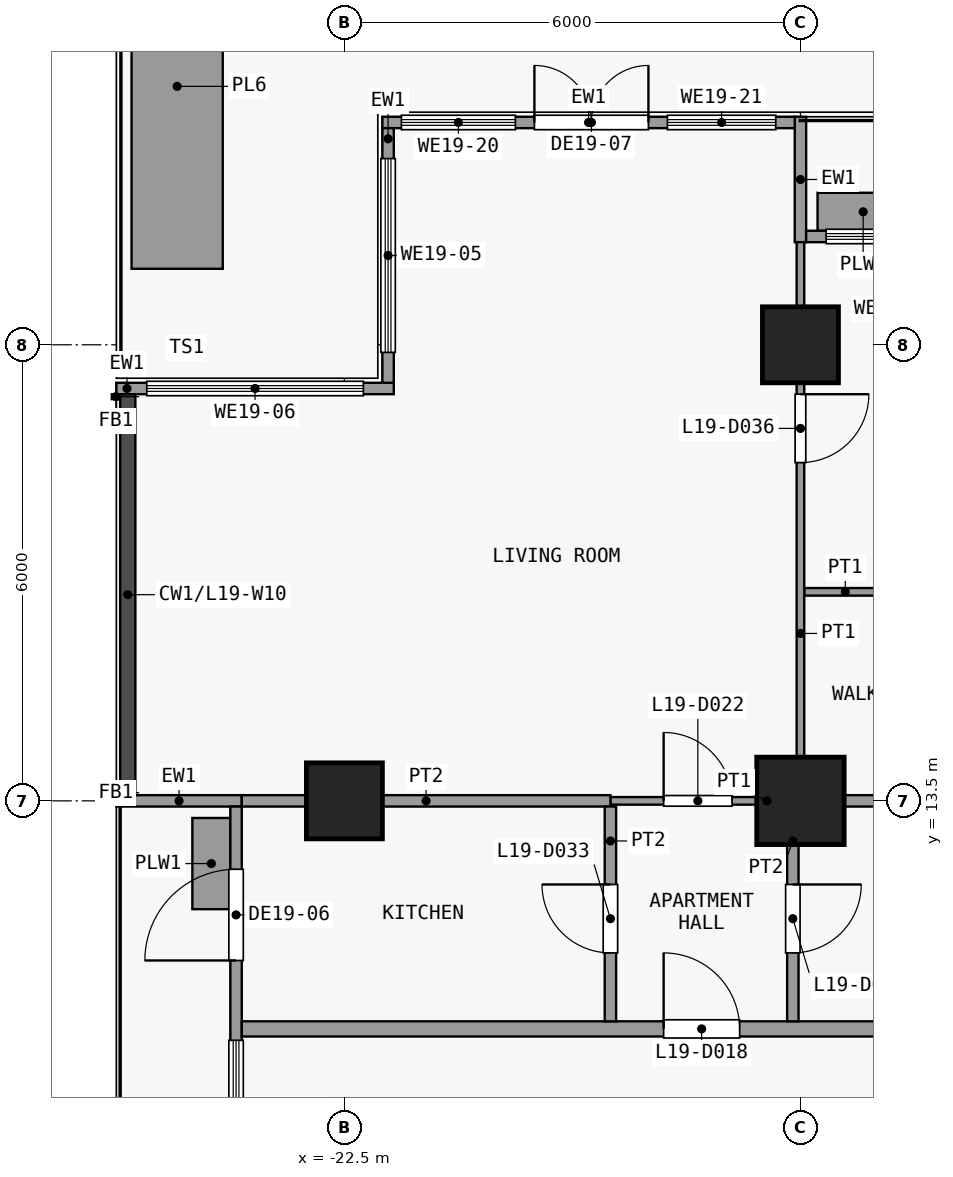
"""IFC4 building model, lengths in metres.
Left out: names, types, materials, properties, quantities, classifications, styles, units other than length and angle.
Written with IfcOpenShell. Run it as: python <this file> out.ifc"""

import sys

from ifc_helpers import new_model, si_unit, direction, frame, frame_2d, origin, origin_2d, place, context, subcontext, project, spatial, rectangle, extrude, element, fill, save


model = new_model("IFC4")
c1 = context("Model", 3, precision=1e-05, world=origin(), true_north=direction((0.0, 1.0)))
c2 = subcontext(c1, "Body", "Model", "MODEL_VIEW")
j1 = project(units=[si_unit("LENGTHUNIT", "METRE"), si_unit("PLANEANGLEUNIT", "RADIAN")], contexts=[c1])
p1 = place(None, origin())
s1 = spatial("IfcSite", under=j1, at=p1, CompositionType="ELEMENT")
p2 = place(p1, origin())
s2 = spatial("IfcBuilding", under=s1, at=p2, CompositionType="ELEMENT")
p3 = place(p2, frame((0.0, 0.0, 81.1)))
s3 = spatial("IfcBuildingStorey", under=s2, at=p3, CompositionType="ELEMENT", Elevation=81.1)
p4 = place(p3, frame((-22.5, 13.5, 0.0), z_axis=(0.0, 0.0, 1.0), x_axis=(1.0, 0.0, 0.0)))
e1 = element("IfcColumn", 1, at=p4, inside=s3, PredefinedType="COLUMN", context=c2, shape_type="SweptSolid", body=[
    extrude(rectangle(XDim=1.0, YDim=1.0, at=origin_2d()), origin(), (0.0, 0.0, 1.0), 3.6),
])
p5 = place(p3, frame((-16.5, 13.5, 0.0), z_axis=(0.0, 0.0, 1.0), x_axis=(1.0, 0.0, 0.0)))
e2 = element("IfcColumn", 2, at=p5, inside=s3, PredefinedType="COLUMN", context=c2, shape_type="SweptSolid", body=[
    extrude(rectangle(XDim=1.15, YDim=1.15, at=origin_2d()), origin(), (0.0, 0.0, 1.0), 3.6),
])
p6 = place(p3, frame((-16.5, 19.5, 0.0), z_axis=(0.0, 0.0, 1.0), x_axis=(1.0, 0.0, 0.0)))
e3 = element("IfcColumn", 3, at=p6, inside=s3, PredefinedType="COLUMN", context=c2, shape_type="SweptSolid", body=[
    extrude(rectangle(XDim=1.0, YDim=1.0, at=origin_2d()), origin(), (0.0, 0.0, 1.0), 3.6),
])
p7 = place(p3, frame((-21.925, 19.0, 0.0), z_axis=(0.0, 0.0, 1.0), x_axis=(0.0, 1.0, 0.0)))
e4 = element("IfcWall", 4, at=p7, inside=s3, PredefinedType="SOLIDWALL", context=c2, shape_type="SweptSolid", body=[
    extrude(rectangle(XDim=3.35, YDim=0.15, at=frame_2d((1.675, 0.0))), origin(), (0.0, 0.0, 1.0), 3.3),
])
p8 = place(p7, frame((0.4, 0.0, 0.9)))
e5 = element("IfcOpeningElement", 5, at=p8, cuts=e4, PredefinedType="OPENING", context=c2, shape_type="SweptSolid", body=[
    extrude(rectangle(XDim=2.55, YDim=2.4, at=frame_2d((1.275, 1.2))), frame((0.0, 0.085, 0.0), z_axis=(0.0, -1.0, 0.0), x_axis=(1.0, 0.0, 0.0)), (0.0, 0.0, 1.0), 0.17),
])
p9 = place(p3, frame((-25.5, 18.925, 0.0), z_axis=(0.0, 0.0, 1.0), x_axis=(1.0, 0.0, 0.0)))
e6 = element("IfcWall", 6, at=p9, inside=s3, PredefinedType="SOLIDWALL", context=c2, shape_type="SweptSolid", body=[
    extrude(rectangle(XDim=3.65, YDim=0.15, at=frame_2d((1.825, 0.0))), origin(), (0.0, 0.0, 1.0), 3.3),
])
p10 = place(p9, frame((0.4, 0.0, 0.9)))
e7 = element("IfcOpeningElement", 7, at=p10, cuts=e6, PredefinedType="OPENING", context=c2, shape_type="SweptSolid", body=[
    extrude(rectangle(XDim=2.85, YDim=2.4, at=frame_2d((1.425, 1.2))), frame((0.0, 0.085, 0.0), z_axis=(0.0, -1.0, 0.0), x_axis=(1.0, 0.0, 0.0)), (0.0, 0.0, 1.0), 0.17),
])
p11 = place(p3, frame((-16.5, 20.85, 0.0), z_axis=(0.0, 0.0, 1.0), x_axis=(0.0, 1.0, 0.0)))
e8 = element("IfcWall", 8, at=p11, inside=s3, PredefinedType="SOLIDWALL", context=c2, shape_type="SweptSolid", body=[
    extrude(rectangle(XDim=1.65, YDim=0.15, at=frame_2d((0.825, 0.0))), origin(), (0.0, 0.0, 1.0), 3.3),
])
p12 = place(p3, frame((-16.425, 20.925, 0.0), z_axis=(0.0, 0.0, 1.0), x_axis=(1.0, 0.0, 0.0)))
e9 = element("IfcWall", 9, at=p12, inside=s3, PredefinedType="SOLIDWALL", context=c2, shape_type="SweptSolid", body=[
    extrude(rectangle(XDim=5.85, YDim=0.15, at=frame_2d((2.925, 0.0))), origin(), (0.0, 0.0, 1.0), 3.3),
])
p13 = place(p12, frame((2.325, 0.0, 0.0)))
e10 = element("IfcOpeningElement", 10, at=p13, cuts=e9, PredefinedType="OPENING", context=c2, shape_type="SweptSolid", body=[
    extrude(rectangle(XDim=1.2, YDim=2.4, at=frame_2d((0.6, 1.2))), frame((0.0, 0.085, 0.0), z_axis=(0.0, -1.0, 0.0), x_axis=(1.0, 0.0, 0.0)), (0.0, 0.0, 1.0), 0.17),
])
p14 = place(p12, frame((0.262, 0.0, 0.9)))
e11 = element("IfcOpeningElement", 11, at=p14, cuts=e9, PredefinedType="OPENING", context=c2, shape_type="SweptSolid", body=[
    extrude(rectangle(XDim=1.8, YDim=2.1, at=frame_2d((0.9, 1.05))), frame((0.0, 0.085, 0.0), z_axis=(0.0, -1.0, 0.0), x_axis=(1.0, 0.0, 0.0)), (0.0, 0.0, 1.0), 0.17),
])
p15 = place(p12, frame((3.788, 0.0, 0.9)))
e12 = element("IfcOpeningElement", 12, at=p15, cuts=e9, PredefinedType="OPENING", context=c2, shape_type="SweptSolid", body=[
    extrude(rectangle(XDim=1.8, YDim=2.1, at=frame_2d((0.9, 1.05))), frame((0.0, 0.085, 0.0), z_axis=(0.0, -1.0, 0.0), x_axis=(1.0, 0.0, 0.0)), (0.0, 0.0, 1.0), 0.17),
])
p16 = place(p3, frame((-16.275, 21.25, 0.0), z_axis=(0.0, 0.0, 1.0), x_axis=(1.0, 0.0, 0.0)))
e13 = element("IfcWall", 13, at=p16, inside=s3, PredefinedType="USERDEFINED", context=c2, shape_type="SweptSolid", body=[
    extrude(rectangle(XDim=1.2, YDim=0.5, at=frame_2d((0.6, 0.0))), origin(), (0.0, 0.0, 1.0), 0.9),
])
p17 = place(p3, frame((-23.85, 13.5, 0.0), z_axis=(0.0, 0.0, 1.0), x_axis=(-1.0, 0.0, 0.0)))
e14 = element("IfcWall", 14, at=p17, inside=s3, PredefinedType="SOLIDWALL", context=c2, shape_type="SweptSolid", body=[
    extrude(rectangle(XDim=1.65, YDim=0.15, at=frame_2d((0.825, 0.0))), origin(), (0.0, 0.0, 1.0), 3.3),
])
p18 = place(p3, frame((-23.925, 7.5, 0.0), z_axis=(0.0, 0.0, 1.0), x_axis=(0.0, 1.0, 0.0)))
e15 = element("IfcWall", 15, at=p18, inside=s3, PredefinedType="SOLIDWALL", context=c2, shape_type="SweptSolid", body=[
    extrude(rectangle(XDim=5.925, YDim=0.15, at=frame_2d((2.962, 0.0))), origin(), (0.0, 0.0, 1.0), 3.3),
])
p19 = place(p18, frame((3.9, 0.0, 0.0)))
e16 = element("IfcOpeningElement", 16, at=p19, cuts=e15, PredefinedType="OPENING", context=c2, shape_type="SweptSolid", body=[
    extrude(rectangle(XDim=1.2, YDim=2.4, at=frame_2d((0.6, 1.2))), frame((0.0, 0.085, 0.0), z_axis=(0.0, -1.0, 0.0), x_axis=(1.0, 0.0, 0.0)), (0.0, 0.0, 1.0), 0.17),
])
p20 = place(p18, frame((1.05, 0.0, 0.9)))
e17 = element("IfcOpeningElement", 17, at=p20, cuts=e15, PredefinedType="OPENING", context=c2, shape_type="SweptSolid", body=[
    extrude(rectangle(XDim=1.8, YDim=2.1, at=frame_2d((0.9, 1.05))), frame((0.0, 0.085, 0.0), z_axis=(0.0, -1.0, 0.0), x_axis=(1.0, 0.0, 0.0)), (0.0, 0.0, 1.0), 0.17),
])
p21 = place(p3, frame((-24.25, 12.075, 0.0), z_axis=(0.0, 0.0, 1.0), x_axis=(0.0, 1.0, 0.0)))
e18 = element("IfcWall", 18, at=p21, inside=s3, PredefinedType="USERDEFINED", context=c2, shape_type="SweptSolid", body=[
    extrude(rectangle(XDim=1.2, YDim=0.5, at=frame_2d((0.6, 0.0))), origin(), (0.0, 0.0, 1.0), 0.9),
])
p22 = place(p3, frame((-22.0, 22.425, 0.0), z_axis=(0.0, 0.0, 1.0), x_axis=(1.0, 0.0, 0.0)))
e19 = element("IfcWall", 19, at=p22, inside=s3, PredefinedType="SOLIDWALL", context=c2, shape_type="SweptSolid", body=[
    extrude(rectangle(XDim=5.425, YDim=0.15, at=frame_2d((2.712, 0.0))), origin(), (0.0, 0.0, 1.0), 3.3),
])
p23 = place(p22, frame((2.0, 0.0, 0.0)))
e20 = element("IfcOpeningElement", 20, at=p23, cuts=e19, PredefinedType="OPENING", context=c2, shape_type="SweptSolid", body=[
    extrude(rectangle(XDim=1.5, YDim=2.4, at=frame_2d((0.75, 1.2))), frame((0.0, 0.085, 0.0), z_axis=(0.0, -1.0, 0.0), x_axis=(1.0, 0.0, 0.0)), (0.0, 0.0, 1.0), 0.17),
])
p24 = place(p22, frame((0.25, 0.0, 0.9)))
e21 = element("IfcOpeningElement", 21, at=p24, cuts=e19, PredefinedType="OPENING", context=c2, shape_type="SweptSolid", body=[
    extrude(rectangle(XDim=1.5, YDim=2.1, at=frame_2d((0.75, 1.05))), frame((0.0, 0.085, 0.0), z_axis=(0.0, -1.0, 0.0), x_axis=(1.0, 0.0, 0.0)), (0.0, 0.0, 1.0), 0.17),
])
p25 = place(p22, frame((3.75, 0.0, 0.9)))
e22 = element("IfcOpeningElement", 22, at=p25, cuts=e19, PredefinedType="OPENING", context=c2, shape_type="SweptSolid", body=[
    extrude(rectangle(XDim=1.425, YDim=2.1, at=frame_2d((0.712, 1.05))), frame((0.0, 0.085, 0.0), z_axis=(0.0, -1.0, 0.0), x_axis=(1.0, 0.0, 0.0)), (0.0, 0.0, 1.0), 0.17),
])
p26 = place(p3, frame((-24.7, 20.5, 0.0), z_axis=(0.0, 0.0, 1.0), x_axis=(0.0, 1.0, 0.0)))
e23 = element("IfcWall", 23, at=p26, inside=s3, PredefinedType="USERDEFINED", context=c2, shape_type="SweptSolid", body=[
    extrude(rectangle(XDim=4.8, YDim=1.2, at=frame_2d((2.4, 0.0))), origin(), (0.0, 0.0, 1.0), 0.9),
])
p27 = place(p3, frame((-23.85, 10.5, 0.0), z_axis=(0.0, 0.0, 1.0), x_axis=(1.0, 0.0, 0.0)))
e24 = element("IfcWall", 24, at=p27, inside=s3, PredefinedType="PARTITIONING", context=c2, shape_type="SweptSolid", body=[
    extrude(rectangle(XDim=49.2, YDim=0.2, at=frame_2d((24.6, 0.0))), origin(), (0.0, 0.0, 1.0), 3.3),
])
p28 = place(p27, frame((5.55, 0.0, 0.0)))
e25 = element("IfcOpeningElement", 25, at=p28, cuts=e24, PredefinedType="OPENING", context=c2, shape_type="SweptSolid", body=[
    extrude(rectangle(XDim=1.0, YDim=2.1, at=frame_2d((0.5, 1.05))), frame((0.0, 0.11, 0.0), z_axis=(0.0, -1.0, 0.0), x_axis=(1.0, 0.0, 0.0)), (0.0, 0.0, 1.0), 0.22),
])
p29 = place(p27, frame((14.05, 0.0, 0.0)))
e26 = element("IfcOpeningElement", 26, at=p29, cuts=e24, PredefinedType="OPENING", context=c2, shape_type="SweptSolid", body=[
    extrude(rectangle(XDim=1.0, YDim=2.1, at=frame_2d((0.5, 1.05))), frame((0.0, 0.11, 0.0), z_axis=(0.0, -1.0, 0.0), x_axis=(1.0, 0.0, 0.0)), (0.0, 0.0, 1.0), 0.22),
])
p30 = place(p27, frame((22.55, 0.0, 0.0)))
e27 = element("IfcOpeningElement", 27, at=p30, cuts=e24, PredefinedType="OPENING", context=c2, shape_type="SweptSolid", body=[
    extrude(rectangle(XDim=1.0, YDim=2.1, at=frame_2d((0.5, 1.05))), frame((0.0, 0.11, 0.0), z_axis=(0.0, -1.0, 0.0), x_axis=(1.0, 0.0, 0.0)), (0.0, 0.0, 1.0), 0.22),
])
p31 = place(p27, frame((43.55, 0.0, 0.0)))
e28 = element("IfcOpeningElement", 28, at=p31, cuts=e24, PredefinedType="OPENING", context=c2, shape_type="SweptSolid", body=[
    extrude(rectangle(XDim=1.0, YDim=2.1, at=frame_2d((0.5, 1.05))), frame((0.0, 0.11, 0.0), z_axis=(0.0, -1.0, 0.0), x_axis=(1.0, 0.0, 0.0)), (0.0, 0.0, 1.0), 0.22),
])
p32 = place(p3, frame((-19.0, 13.5, 0.0), z_axis=(0.0, 0.0, 1.0), x_axis=(1.0, 0.0, 0.0)))
e29 = element("IfcWall", 29, at=p32, inside=s3, PredefinedType="PARTITIONING", context=c2, shape_type="SweptSolid", body=[
    extrude(rectangle(XDim=2.4, YDim=0.1, at=frame_2d((1.2, 0.0))), origin(), (0.0, 0.0, 1.0), 3.3),
])
p33 = place(p32, frame((0.7, 0.0, 0.0)))
e30 = element("IfcOpeningElement", 30, at=p33, cuts=e29, PredefinedType="OPENING", context=c2, shape_type="SweptSolid", body=[
    extrude(rectangle(XDim=0.9, YDim=2.1, at=frame_2d((0.45, 1.05))), frame((0.0, 0.06, 0.0), z_axis=(0.0, -1.0, 0.0), x_axis=(1.0, 0.0, 0.0)), (0.0, 0.0, 1.0), 0.12),
])
p34 = place(p3, frame((-23.85, 13.5, 0.0), z_axis=(0.0, 0.0, 1.0), x_axis=(1.0, 0.0, 0.0)))
e31 = element("IfcWall", 31, at=p34, inside=s3, PredefinedType="PARTITIONING", context=c2, shape_type="SweptSolid", body=[
    extrude(rectangle(XDim=4.85, YDim=0.15, at=frame_2d((2.425, 0.0))), origin(), (0.0, 0.0, 1.0), 3.3),
])
p35 = place(p3, frame((-16.5, 13.5, 0.0), z_axis=(0.0, 0.0, 1.0), x_axis=(1.0, 0.0, 0.0)))
e32 = element("IfcWall", 32, at=p35, inside=s3, PredefinedType="PARTITIONING", context=c2, shape_type="SweptSolid", body=[
    extrude(rectangle(XDim=6.0, YDim=0.15, at=frame_2d((3.0, 0.0))), origin(), (0.0, 0.0, 1.0), 3.3),
])
p36 = place(p3, frame((-16.45, 16.25, 0.0), z_axis=(0.0, 0.0, 1.0), x_axis=(1.0, 0.0, 0.0)))
e33 = element("IfcWall", 33, at=p36, inside=s3, PredefinedType="PARTITIONING", context=c2, shape_type="SweptSolid", body=[
    extrude(rectangle(XDim=3.25, YDim=0.1, at=frame_2d((1.625, 0.0))), origin(), (0.0, 0.0, 1.0), 3.3),
])
p37 = place(p36, frame((1.2, 0.0, 0.0)))
e34 = element("IfcOpeningElement", 34, at=p37, cuts=e33, PredefinedType="OPENING", context=c2, shape_type="SweptSolid", body=[
    extrude(rectangle(XDim=0.9, YDim=2.1, at=frame_2d((0.45, 1.05))), frame((0.0, 0.06, 0.0), z_axis=(0.0, -1.0, 0.0), x_axis=(1.0, 0.0, 0.0)), (0.0, 0.0, 1.0), 0.12),
])
p38 = place(p3, frame((-19.0, 10.6, 0.0), z_axis=(0.0, 0.0, 1.0), x_axis=(0.0, 1.0, 0.0)))
e35 = element("IfcWall", 35, at=p38, inside=s3, PredefinedType="PARTITIONING", context=c2, shape_type="SweptSolid", body=[
    extrude(rectangle(XDim=2.825, YDim=0.15, at=frame_2d((1.413, 0.0))), origin(), (0.0, 0.0, 1.0), 3.3),
])
p39 = place(p38, frame((0.9, 0.0, 0.0)))
e36 = element("IfcOpeningElement", 36, at=p39, cuts=e35, PredefinedType="OPENING", context=c2, shape_type="SweptSolid", body=[
    extrude(rectangle(XDim=0.9, YDim=2.1, at=frame_2d((0.45, 1.05))), frame((0.0, 0.085, 0.0), z_axis=(0.0, -1.0, 0.0), x_axis=(1.0, 0.0, 0.0)), (0.0, 0.0, 1.0), 0.17),
])
p40 = place(p3, frame((-16.6, 10.6, 0.0), z_axis=(0.0, 0.0, 1.0), x_axis=(0.0, 1.0, 0.0)))
e37 = element("IfcWall", 37, at=p40, inside=s3, PredefinedType="PARTITIONING", context=c2, shape_type="SweptSolid", body=[
    extrude(rectangle(XDim=2.825, YDim=0.15, at=frame_2d((1.413, 0.0))), origin(), (0.0, 0.0, 1.0), 3.3),
])
p41 = place(p40, frame((0.9, 0.0, 0.0)))
e38 = element("IfcOpeningElement", 38, at=p41, cuts=e37, PredefinedType="OPENING", context=c2, shape_type="SweptSolid", body=[
    extrude(rectangle(XDim=0.9, YDim=2.1, at=frame_2d((0.45, 1.05))), frame((0.0, 0.085, 0.0), z_axis=(0.0, -1.0, 0.0), x_axis=(1.0, 0.0, 0.0)), (0.0, 0.0, 1.0), 0.17),
])
p42 = place(p3, frame((-16.5, 13.575, 0.0), z_axis=(0.0, 0.0, 1.0), x_axis=(0.0, 1.0, 0.0)))
e39 = element("IfcWall", 39, at=p42, inside=s3, PredefinedType="PARTITIONING", context=c2, shape_type="SweptSolid", body=[
    extrude(rectangle(XDim=7.275, YDim=0.1, at=frame_2d((3.638, 0.0))), origin(), (0.0, 0.0, 1.0), 3.3),
])
p43 = place(p42, frame((4.375, 0.0, 0.0)))
e40 = element("IfcOpeningElement", 40, at=p43, cuts=e39, PredefinedType="OPENING", context=c2, shape_type="SweptSolid", body=[
    extrude(rectangle(XDim=0.9, YDim=2.1, at=frame_2d((0.45, 1.05))), frame((0.0, 0.06, 0.0), z_axis=(0.0, -1.0, 0.0), x_axis=(1.0, 0.0, 0.0)), (0.0, 0.0, 1.0), 0.12),
])
p44 = place(p8, origin())
e41 = element("IfcWindow", 41, at=p44, inside=s3, PartitioningType="SINGLE_PANEL", PredefinedType="WINDOW", context=c2, shape_type="SweptSolid", body=[
    extrude(rectangle(XDim=2.55, YDim=2.4, at=frame_2d((1.275, 1.2))), frame((0.0, 0.03, 0.0), z_axis=(0.0, -1.0, 0.0), x_axis=(1.0, 0.0, 0.0)), (0.0, 0.0, 1.0), 0.06),
])
fill(e5, e41)
p45 = place(p10, origin())
e42 = element("IfcWindow", 42, at=p45, inside=s3, PartitioningType="SINGLE_PANEL", PredefinedType="WINDOW", context=c2, shape_type="SweptSolid", body=[
    extrude(rectangle(XDim=2.85, YDim=2.4, at=frame_2d((1.425, 1.2))), frame((0.0, 0.03, 0.0), z_axis=(0.0, -1.0, 0.0), x_axis=(1.0, 0.0, 0.0)), (0.0, 0.0, 1.0), 0.06),
])
fill(e7, e42)
p46 = place(p14, origin())
e43 = element("IfcWindow", 43, at=p46, inside=s3, PartitioningType="SINGLE_PANEL", PredefinedType="WINDOW", context=c2, shape_type="SweptSolid", body=[
    extrude(rectangle(XDim=1.8, YDim=2.1, at=frame_2d((0.9, 1.05))), frame((0.0, 0.03, 0.0), z_axis=(0.0, -1.0, 0.0), x_axis=(1.0, 0.0, 0.0)), (0.0, 0.0, 1.0), 0.06),
])
fill(e11, e43)
p47 = place(p19, origin())
e44 = element("IfcDoor", 44, at=p47, inside=s3, OperationType="SINGLE_SWING_LEFT", PredefinedType="DOOR", context=c2, shape_type="SweptSolid", body=[
    extrude(rectangle(XDim=1.2, YDim=2.4, at=frame_2d((0.6, 1.2))), frame((0.0, 0.025, 0.0), z_axis=(0.0, -1.0, 0.0), x_axis=(1.0, 0.0, 0.0)), (0.0, 0.0, 1.0), 0.05),
])
fill(e16, e44)
p48 = place(p20, origin())
e45 = element("IfcWindow", 45, at=p48, inside=s3, PartitioningType="SINGLE_PANEL", PredefinedType="WINDOW", context=c2, shape_type="SweptSolid", body=[
    extrude(rectangle(XDim=1.8, YDim=2.1, at=frame_2d((0.9, 1.05))), frame((0.0, 0.03, 0.0), z_axis=(0.0, -1.0, 0.0), x_axis=(1.0, 0.0, 0.0)), (0.0, 0.0, 1.0), 0.06),
])
fill(e17, e45)
p49 = place(p23, origin())
e46 = element("IfcDoor", 46, at=p49, inside=s3, OperationType="DOUBLE_DOOR_SINGLE_SWING", PredefinedType="DOOR", context=c2, shape_type="SweptSolid", body=[
    extrude(rectangle(XDim=1.5, YDim=2.4, at=frame_2d((0.75, 1.2))), frame((0.0, 0.025, 0.0), z_axis=(0.0, -1.0, 0.0), x_axis=(1.0, 0.0, 0.0)), (0.0, 0.0, 1.0), 0.05),
])
fill(e20, e46)
p50 = place(p24, origin())
e47 = element("IfcWindow", 47, at=p50, inside=s3, PartitioningType="SINGLE_PANEL", PredefinedType="WINDOW", context=c2, shape_type="SweptSolid", body=[
    extrude(rectangle(XDim=1.5, YDim=2.1, at=frame_2d((0.75, 1.05))), frame((0.0, 0.03, 0.0), z_axis=(0.0, -1.0, 0.0), x_axis=(1.0, 0.0, 0.0)), (0.0, 0.0, 1.0), 0.06),
])
fill(e21, e47)
p51 = place(p25, origin())
e48 = element("IfcWindow", 48, at=p51, inside=s3, PartitioningType="SINGLE_PANEL", PredefinedType="WINDOW", context=c2, shape_type="SweptSolid", body=[
    extrude(rectangle(XDim=1.425, YDim=2.1, at=frame_2d((0.712, 1.05))), frame((0.0, 0.03, 0.0), z_axis=(0.0, -1.0, 0.0), x_axis=(1.0, 0.0, 0.0)), (0.0, 0.0, 1.0), 0.06),
])
fill(e22, e48)
p52 = place(p28, origin())
e49 = element("IfcDoor", 49, at=p52, inside=s3, OperationType="SINGLE_SWING_RIGHT", PredefinedType="DOOR", context=c2, shape_type="SweptSolid", body=[
    extrude(rectangle(XDim=1.0, YDim=2.1, at=frame_2d((0.5, 1.05))), frame((0.0, 0.025, 0.0), z_axis=(0.0, -1.0, 0.0), x_axis=(1.0, 0.0, 0.0)), (0.0, 0.0, 1.0), 0.05),
])
fill(e25, e49)
p53 = place(p33, origin())
e50 = element("IfcDoor", 50, at=p53, inside=s3, OperationType="SINGLE_SWING_RIGHT", PredefinedType="DOOR", context=c2, shape_type="SweptSolid", body=[
    extrude(rectangle(XDim=0.9, YDim=2.1, at=frame_2d((0.45, 1.05))), frame((0.0, 0.025, 0.0), z_axis=(0.0, -1.0, 0.0), x_axis=(1.0, 0.0, 0.0)), (0.0, 0.0, 1.0), 0.05),
])
fill(e30, e50)
p54 = place(p39, origin())
e51 = element("IfcDoor", 51, at=p54, inside=s3, OperationType="SINGLE_SWING_LEFT", PredefinedType="DOOR", context=c2, shape_type="SweptSolid", body=[
    extrude(rectangle(XDim=0.9, YDim=2.1, at=frame_2d((0.45, 1.05))), frame((0.0, 0.025, 0.0), z_axis=(0.0, -1.0, 0.0), x_axis=(1.0, 0.0, 0.0)), (0.0, 0.0, 1.0), 0.05),
])
fill(e36, e51)
p55 = place(p41, origin())
e52 = element("IfcDoor", 52, at=p55, inside=s3, OperationType="SINGLE_SWING_RIGHT", PredefinedType="DOOR", context=c2, shape_type="SweptSolid", body=[
    extrude(rectangle(XDim=0.9, YDim=2.1, at=frame_2d((0.45, 1.05))), frame((0.0, 0.025, 0.0), z_axis=(0.0, -1.0, 0.0), x_axis=(1.0, 0.0, 0.0)), (0.0, 0.0, 1.0), 0.05),
])
fill(e38, e52)
p56 = place(p43, origin())
e53 = element("IfcDoor", 53, at=p56, inside=s3, OperationType="SINGLE_SWING_RIGHT", PredefinedType="DOOR", context=c2, shape_type="SweptSolid", body=[
    extrude(rectangle(XDim=0.9, YDim=2.1, at=frame_2d((0.45, 1.05))), frame((0.0, 0.025, 0.0), z_axis=(0.0, -1.0, 0.0), x_axis=(1.0, 0.0, 0.0)), (0.0, 0.0, 1.0), 0.05),
])
fill(e40, e53)
save(model, sys.argv[1])
